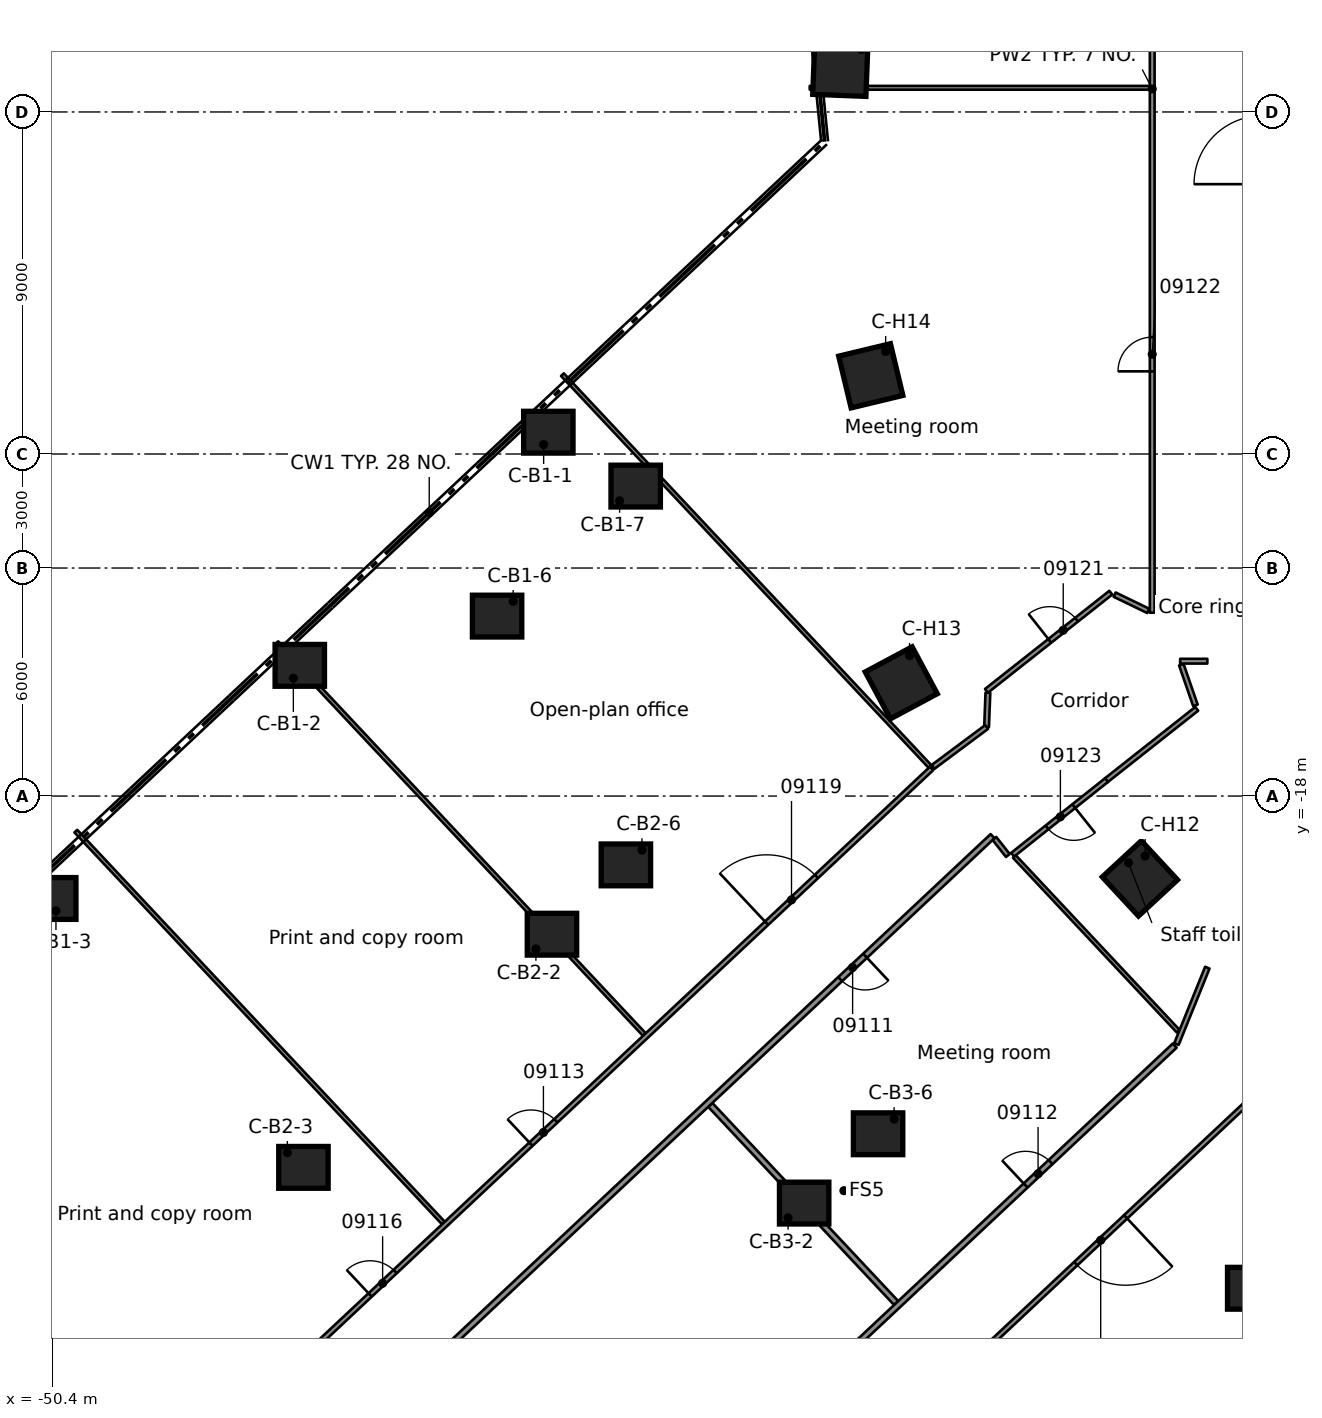
"""IFC4 building model, lengths in metres.
Left out: names, types, materials, properties, quantities, classifications, styles, units other than length and angle.
Written with IfcOpenShell. Run it as: python <this file> out.ifc"""

import sys

from ifc_helpers import new_model, si_unit, direction, frame, frame_2d, origin, origin_2d, place, context, subcontext, project, spatial, rectangle, extrude, element, fill, save


model = new_model("IFC4")
c1 = context("Model", 3, precision=1e-05, world=origin(), true_north=direction((0.0, 1.0)))
c2 = subcontext(c1, "Body", "Model", "MODEL_VIEW")
j1 = project(units=[si_unit("LENGTHUNIT", "METRE"), si_unit("PLANEANGLEUNIT", "RADIAN")], contexts=[c1])
p1 = place(None, origin())
s1 = spatial("IfcSite", under=j1, at=p1, CompositionType="ELEMENT")
p2 = place(p1, origin())
s2 = spatial("IfcBuilding", under=s1, at=p2, CompositionType="ELEMENT")
p3 = place(p2, frame((0.0, 0.0, 40.8)))
s3 = spatial("IfcBuildingStorey", under=s2, at=p3, CompositionType="ELEMENT", Elevation=40.8)
for number, where, z_axis, x_axis in (
    (1, (-37.341, -8.426, 0.0), (0.0, 0.0, 1.0), (1.0, 0.0, 0.0)),
    (2, (-43.881, -14.561, 0.0), (0.0, 0.0, 1.0), (1.0, 0.0, 0.0)),
    (3, (-50.421, -20.695, 0.0), (0.0, 0.0, 1.0), (1.0, 0.0, 0.0)),
    (4, (-38.689, -13.265, 0.0), (0.0, 0.0, 1.0), (1.0, 0.0, 0.0)),
    (5, (-35.042, -9.844, 0.0), (0.0, 0.0, 1.0), (1.0, 0.0, 0.0)),
    (6, (-37.245, -21.635, 0.0), (0.0, 0.0, 1.0), (1.0, 0.0, 0.0)),
    (7, (-43.785, -27.77, 0.0), (0.0, 0.0, 1.0), (1.0, 0.0, 0.0)),
    (8, (-35.3, -19.811, 0.0), (0.0, 0.0, 1.0), (1.0, 0.0, 0.0)),
    (9, (-30.609, -28.71, 0.0), (0.0, 0.0, 1.0), (1.0, 0.0, 0.0)),
    (10, (-28.664, -26.886, 0.0), (0.0, 0.0, 1.0), (1.0, 0.0, 0.0)),
    (11, (-18.819, -30.951, 0.0), (0.0, 0.0, 1.0), (1.0, 0.0, 0.0)),
):
    element("IfcColumn", number, at=place(p3, frame(where, z_axis=z_axis, x_axis=x_axis)), inside=s3, PredefinedType="COLUMN", context=c2, shape_type="SweptSolid", body=[
        extrude(rectangle(XDim=1.3, YDim=1.1, at=origin_2d()), origin(), (0.0, 0.0, 1.0), 3.5),
    ])
for number, where, z_axis, x_axis in (
    (12, (-21.774, -20.167, 0.0), (0.0, 0.0, 1.0), (-0.734, -0.68, 0.0)),
    (13, (-28.054, -15.021, 0.0), (0.0, 0.0, 1.0), (-0.882, -0.472, 0.0)),
    (14, (-28.856, -6.942, 0.0), (0.0, 0.0, 1.0), (-0.972, -0.234, 0.0)),
    (15, (-29.657, 1.136, 0.0), (0.0, 0.0, 1.0), (-0.999, 0.038, 0.0)),
):
    element("IfcColumn", number, at=place(p3, frame(where, z_axis=z_axis, x_axis=x_axis)), inside=s3, PredefinedType="COLUMN", context=c2, shape_type="SweptSolid", body=[
        extrude(rectangle(XDim=1.4, YDim=1.4, at=origin_2d()), origin(), (0.0, 0.0, 1.0), 3.5),
    ])
p4 = place(p3, frame((-20.684, -14.543, 0.0), z_axis=(0.0, 0.0, 1.0), x_axis=(0.32765097617, -0.944798834575, 0.0)))
e16 = element("IfcWall", 16, at=p4, inside=s3, PredefinedType="PARTITIONING", context=c2, shape_type="SweptSolid", body=[
    extrude(rectangle(XDim=1.133, YDim=0.125, at=frame_2d((0.566, 0.0))), origin(), (0.0, 0.0, 1.0), 3.06),
])
p5 = place(p3, frame((-25.604, -19.114, 0.0), z_axis=(0.0, 0.0, 1.0), x_axis=(0.619381829891, -0.785089898548, 0.0)))
e17 = element("IfcWall", 17, at=p5, inside=s3, PredefinedType="PARTITIONING", context=c2, shape_type="SweptSolid", body=[
    extrude(rectangle(XDim=0.573, YDim=0.125, at=frame_2d((0.287, 0.0))), origin(), (0.0, 0.0, 1.0), 3.06),
])
p6 = place(p3, frame((-25.774, -15.281, 0.0), z_axis=(0.0, 0.0, 1.0), x_axis=(-0.038899975067, -0.999243109528, 0.0)))
e18 = element("IfcWall", 18, at=p6, inside=s3, PredefinedType="PARTITIONING", context=c2, shape_type="SweptSolid", body=[
    extrude(rectangle(XDim=0.904, YDim=0.125, at=frame_2d((0.452, 0.0))), origin(), (0.0, 0.0, 1.0), 3.06),
])
p7 = place(p3, frame((-49.774, -18.923, 0.0), z_axis=(0.0, 0.0, 1.0), x_axis=(0.684111730838, -0.729377227317, 0.0)))
e19 = element("IfcWall", 19, at=p7, inside=s3, PredefinedType="PARTITIONING", context=c2, shape_type="SweptSolid", body=[
    extrude(rectangle(XDim=14.136, YDim=0.1, at=frame_2d((7.068, 0.0))), origin(), (0.0, 0.0, 1.0), 3.06),
])
p8 = place(p3, frame((-44.487, -13.963, 0.0), z_axis=(0.0, 0.0, 1.0), x_axis=(0.684112301014, -0.729376692526, 0.0)))
e20 = element("IfcWall", 20, at=p8, inside=s3, PredefinedType="PARTITIONING", context=c2, shape_type="SweptSolid", body=[
    extrude(rectangle(XDim=14.137, YDim=0.1, at=frame_2d((7.068, 0.0))), origin(), (0.0, 0.0, 1.0), 3.06),
])
p9 = place(p3, frame((-33.079, -26.126, 0.0), z_axis=(0.0, 0.0, 1.0), x_axis=(0.684155795313, -0.729335895003, 0.0)))
e21 = element("IfcWall", 21, at=p9, inside=s3, PredefinedType="PARTITIONING", context=c2, shape_type="SweptSolid", body=[
    extrude(rectangle(XDim=7.149, YDim=0.15, at=frame_2d((3.575, 0.0))), origin(), (0.0, 0.0, 1.0), 3.06),
])
p10 = place(p3, frame((-36.97, -6.912, 0.0), z_axis=(0.0, 0.0, 1.0), x_axis=(0.684148478852, -0.729342758163, 0.0)))
e22 = element("IfcWall", 22, at=p10, inside=s3, PredefinedType="PARTITIONING", context=c2, shape_type="SweptSolid", body=[
    extrude(rectangle(XDim=14.137, YDim=0.1, at=frame_2d((7.069, 0.0))), origin(), (0.0, 0.0, 1.0), 3.06),
])
p11 = place(p3, frame((-25.079, -19.589, 0.0), z_axis=(0.0, 0.0, 1.0), x_axis=(0.684071212636, -0.729415228825, 0.0)))
e23 = element("IfcWall", 23, at=p11, inside=s3, PredefinedType="PARTITIONING", context=c2, shape_type="SweptSolid", body=[
    extrude(rectangle(XDim=6.305, YDim=0.1, at=frame_2d((3.152, 0.0))), origin(), (0.0, 0.0, 1.0), 3.06),
])
p12 = place(p3, frame((-22.439, -12.7, 0.0), z_axis=(0.0, 0.0, 1.0), x_axis=(0.900058849061, -0.435768365335, 0.0)))
e24 = element("IfcWall", 24, at=p12, inside=s3, PredefinedType="PARTITIONING", context=c2, shape_type="SweptSolid", body=[
    extrude(rectangle(XDim=0.984, YDim=0.125, at=frame_2d((0.492, 0.0))), origin(), (0.0, 0.0, 1.0), 3.06),
])
p13 = place(p3, frame((-20.715, -14.451, 0.0), z_axis=(0.0, 0.0, 1.0), x_axis=(1.0, 0.0, 0.0)))
e25 = element("IfcWall", 25, at=p13, inside=s3, PredefinedType="PARTITIONING", context=c2, shape_type="SweptSolid", body=[
    extrude(rectangle(XDim=0.715, YDim=0.125, at=frame_2d((0.357, 0.0))), origin(), (0.0, 0.0, 1.0), 3.06),
])
p14 = place(p3, frame((-30.462, 0.636, 0.0), z_axis=(0.0, 0.0, 1.0), x_axis=(1.0, 0.0, 0.0)))
e26 = element("IfcWall", 26, at=p14, inside=s3, PredefinedType="PARTITIONING", context=c2, shape_type="SweptSolid", body=[
    extrude(rectangle(XDim=8.95, YDim=0.1, at=frame_2d((4.475, 0.0))), origin(), (0.0, 0.0, 1.0), 3.06),
])
p15 = place(p3, frame((-25.809, -16.184, 0.0), z_axis=(0.0, 0.0, 1.0), x_axis=(-0.801880216927, -0.597484826336, 0.0)))
e27 = element("IfcWall", 27, at=p15, inside=s3, PredefinedType="PARTITIONING", context=c2, shape_type="SweptSolid", body=[
    extrude(rectangle(XDim=1.757, YDim=0.125, at=frame_2d((0.878, 0.0))), origin(), (0.0, 0.0, 1.0), 3.06),
])
p16 = place(p3, frame((-22.653, -17.58, 0.0), z_axis=(0.0, 0.0, 1.0), x_axis=(0.784758802797, 0.619801275759, 0.0)))
e28 = element("IfcWall", 28, at=p16, inside=s3, PredefinedType="PARTITIONING", context=c2, shape_type="SweptSolid", body=[
    extrude(rectangle(XDim=3.025, YDim=0.125, at=frame_2d((1.513, 0.0))), origin(), (0.0, 0.0, 1.0), 3.06),
])
p17 = place(p3, frame((-25.812, -15.232, 0.0), z_axis=(0.0, 0.0, 1.0), x_axis=(0.784897756529, 0.619625299513, 0.0)))
e29 = element("IfcWall", 29, at=p17, inside=s3, PredefinedType="PARTITIONING", context=c2, shape_type="SweptSolid", body=[
    extrude(rectangle(XDim=4.169, YDim=0.125, at=frame_2d((2.084, 0.0))), origin(), (0.0, 0.0, 1.0), 3.06),
])
p18 = place(p17, frame((2.124, 0.0, 0.0)))
e30 = element("IfcOpeningElement", 30, at=p18, cuts=e29, PredefinedType="OPENING", context=c2, shape_type="SweptSolid", body=[
    extrude(rectangle(XDim=0.9, YDim=2.1, at=frame_2d((0.45, 1.05))), frame((0.0, 0.073, 0.0), z_axis=(0.0, -1.0, 0.0), x_axis=(1.0, 0.0, 0.0)), (0.0, 0.0, 1.0), 0.145),
])
p19 = place(p3, frame((-22.653, -17.581, 0.0), z_axis=(0.0, 0.0, 1.0), x_axis=(-0.782918971935, -0.622123688171, 0.0)))
e31 = element("IfcWall", 31, at=p19, inside=s3, PredefinedType="PARTITIONING", context=c2, shape_type="SweptSolid", body=[
    extrude(rectangle(XDim=3.154, YDim=0.125, at=frame_2d((1.577, 0.0))), origin(), (0.0, 0.0, 1.0), 3.06),
])
p20 = place(p19, frame((1.1, 0.0, 0.0)))
e32 = element("IfcOpeningElement", 32, at=p20, cuts=e31, PredefinedType="OPENING", context=c2, shape_type="SweptSolid", body=[
    extrude(rectangle(XDim=0.9, YDim=2.1, at=frame_2d((0.45, 1.05))), frame((0.0, 0.073, 0.0), z_axis=(0.0, -1.0, 0.0), x_axis=(1.0, 0.0, 0.0)), (0.0, 0.0, 1.0), 0.145),
])
p21 = place(p3, frame((-18.829, -25.957, 0.0), z_axis=(0.0, 0.0, 1.0), x_axis=(-0.729377966172, -0.684110943096, 0.0)))
e33 = element("IfcWall", 33, at=p21, inside=s3, PredefinedType="PARTITIONING", context=c2, shape_type="SweptSolid", body=[
    extrude(rectangle(XDim=25.009, YDim=0.125, at=frame_2d((12.504, 0.0))), origin(), (0.0, 0.0, 1.0), 3.06),
])
p22 = place(p21, frame((4.552, 0.0, 0.0)))
e34 = element("IfcOpeningElement", 34, at=p22, cuts=e33, PredefinedType="OPENING", context=c2, shape_type="SweptSolid", body=[
    extrude(rectangle(XDim=1.8, YDim=2.1, at=frame_2d((0.9, 1.05))), frame((0.0, 0.073, 0.0), z_axis=(0.0, -1.0, 0.0), x_axis=(1.0, 0.0, 0.0)), (0.0, 0.0, 1.0), 0.145),
])
p23 = place(p21, frame((13.609, 0.0, 0.0)))
e35 = element("IfcOpeningElement", 35, at=p23, cuts=e33, PredefinedType="OPENING", context=c2, shape_type="SweptSolid", body=[
    extrude(rectangle(XDim=0.9, YDim=2.1, at=frame_2d((0.45, 1.05))), frame((0.0, 0.073, 0.0), z_axis=(0.0, -1.0, 0.0), x_axis=(1.0, 0.0, 0.0)), (0.0, 0.0, 1.0), 0.145),
])
p24 = place(p21, frame((20.859, 0.0, 0.0)))
e36 = element("IfcOpeningElement", 36, at=p24, cuts=e33, PredefinedType="OPENING", context=c2, shape_type="SweptSolid", body=[
    extrude(rectangle(XDim=0.9, YDim=2.1, at=frame_2d((0.45, 1.05))), frame((0.0, 0.073, 0.0), z_axis=(0.0, -1.0, 0.0), x_axis=(1.0, 0.0, 0.0)), (0.0, 0.0, 1.0), 0.145),
])
p25 = place(p3, frame((-36.743, -39.467, 0.0), z_axis=(0.0, 0.0, 1.0), x_axis=(0.729355050799, 0.684135373939, 0.0)))
e37 = element("IfcWall", 37, at=p25, inside=s3, PredefinedType="PARTITIONING", context=c2, shape_type="SweptSolid", body=[
    extrude(rectangle(XDim=21.78, YDim=0.15, at=frame_2d((10.89, 0.0))), origin(), (0.0, 0.0, 1.0), 3.06),
])
p26 = place(p25, frame((16.399, 0.0, 0.0)))
e38 = element("IfcOpeningElement", 38, at=p26, cuts=e37, PredefinedType="OPENING", context=c2, shape_type="SweptSolid", body=[
    extrude(rectangle(XDim=0.9, YDim=2.1, at=frame_2d((0.45, 1.05))), frame((0.0, 0.085, 0.0), z_axis=(0.0, -1.0, 0.0), x_axis=(1.0, 0.0, 0.0)), (0.0, 0.0, 1.0), 0.17),
])
p27 = place(p25, frame((5.35, 0.0, 0.0)))
e39 = element("IfcOpeningElement", 39, at=p27, cuts=e37, PredefinedType="OPENING", context=c2, shape_type="SweptSolid", body=[
    extrude(rectangle(XDim=0.9, YDim=2.1, at=frame_2d((0.45, 1.05))), frame((0.0, 0.085, 0.0), z_axis=(0.0, -1.0, 0.0), x_axis=(1.0, 0.0, 0.0)), (0.0, 0.0, 1.0), 0.17),
])
p28 = place(p3, frame((-25.651, -19.055, 0.0), z_axis=(0.0, 0.0, 1.0), x_axis=(-0.729328318393, -0.684163872175, 0.0)))
e40 = element("IfcWall", 40, at=p28, inside=s3, PredefinedType="PARTITIONING", context=c2, shape_type="SweptSolid", body=[
    extrude(rectangle(XDim=22.055, YDim=0.15, at=frame_2d((11.027, 0.0))), origin(), (0.0, 0.0, 1.0), 3.06),
])
p29 = place(p28, frame((4.6, 0.0, 0.0)))
e41 = element("IfcOpeningElement", 41, at=p29, cuts=e40, PredefinedType="OPENING", context=c2, shape_type="SweptSolid", body=[
    extrude(rectangle(XDim=0.9, YDim=2.1, at=frame_2d((0.45, 1.05))), frame((0.0, 0.085, 0.0), z_axis=(0.0, -1.0, 0.0), x_axis=(1.0, 0.0, 0.0)), (0.0, 0.0, 1.0), 0.17),
])
p30 = place(p3, frame((-45.13, -34.035, 0.0), z_axis=(0.0, 0.0, 1.0), x_axis=(0.729450212829, 0.684033907788, 0.0)))
e42 = element("IfcWall", 42, at=p30, inside=s3, PredefinedType="PARTITIONING", context=c2, shape_type="SweptSolid", body=[
    extrude(rectangle(XDim=24.507, YDim=0.125, at=frame_2d((12.254, 0.0))), origin(), (0.0, 0.0, 1.0), 3.06),
])
p31 = place(p30, frame((10.051, 0.0, 0.0)))
e43 = element("IfcOpeningElement", 43, at=p31, cuts=e42, PredefinedType="OPENING", context=c2, shape_type="SweptSolid", body=[
    extrude(rectangle(XDim=0.9, YDim=2.1, at=frame_2d((0.45, 1.05))), frame((0.0, 0.073, 0.0), z_axis=(0.0, -1.0, 0.0), x_axis=(1.0, 0.0, 0.0)), (0.0, 0.0, 1.0), 0.145),
])
p32 = place(p30, frame((4.25, 0.0, 0.0)))
e44 = element("IfcOpeningElement", 44, at=p32, cuts=e42, PredefinedType="OPENING", context=c2, shape_type="SweptSolid", body=[
    extrude(rectangle(XDim=0.9, YDim=2.1, at=frame_2d((0.45, 1.05))), frame((0.0, 0.073, 0.0), z_axis=(0.0, -1.0, 0.0), x_axis=(1.0, 0.0, 0.0)), (0.0, 0.0, 1.0), 0.145),
])
p33 = place(p30, frame((18.55, 0.0, 0.0)))
e45 = element("IfcOpeningElement", 45, at=p33, cuts=e42, PredefinedType="OPENING", context=c2, shape_type="SweptSolid", body=[
    extrude(rectangle(XDim=1.8, YDim=2.1, at=frame_2d((0.9, 1.05))), frame((0.0, 0.073, 0.0), z_axis=(0.0, -1.0, 0.0), x_axis=(1.0, 0.0, 0.0)), (0.0, 0.0, 1.0), 0.145),
])
p34 = place(p3, frame((-20.0, -22.516, 0.0), z_axis=(0.0, 0.0, 1.0), x_axis=(-0.374768568838, -0.92711839579, 0.0)))
e46 = element("IfcWall", 46, at=p34, inside=s3, PredefinedType="PARTITIONING", context=c2, shape_type="SweptSolid", body=[
    extrude(rectangle(XDim=2.167, YDim=0.125, at=frame_2d((1.083, 0.0))), origin(), (0.0, 0.0, 1.0), 3.06),
])
p35 = place(p3, frame((-21.45, -13.175, 0.0), z_axis=(0.0, 0.0, 1.0), x_axis=(0.0, 1.0, 0.0)))
e47 = element("IfcWall", 47, at=p35, inside=s3, PredefinedType="PARTITIONING", context=c2, shape_type="SweptSolid", body=[
    extrude(rectangle(XDim=27.561, YDim=0.125, at=frame_2d((13.781, 0.0))), origin(), (0.0, 0.0, 1.0), 3.06),
])
p36 = place(p35, frame((6.35, 0.0, 0.0)))
e48 = element("IfcOpeningElement", 48, at=p36, cuts=e47, PredefinedType="OPENING", context=c2, shape_type="SweptSolid", body=[
    extrude(rectangle(XDim=0.9, YDim=2.1, at=frame_2d((0.45, 1.05))), frame((0.0, 0.073, 0.0), z_axis=(0.0, -1.0, 0.0), x_axis=(1.0, 0.0, 0.0)), (0.0, 0.0, 1.0), 0.145),
])
p37 = place(p35, frame((16.911, 0.0, 0.0)))
e49 = element("IfcOpeningElement", 49, at=p37, cuts=e47, PredefinedType="OPENING", context=c2, shape_type="SweptSolid", body=[
    extrude(rectangle(XDim=1.8, YDim=2.1, at=frame_2d((0.9, 1.05))), frame((0.0, 0.073, 0.0), z_axis=(0.0, -1.0, 0.0), x_axis=(1.0, 0.0, 0.0)), (0.0, 0.0, 1.0), 0.145),
])
p38 = place(p35, frame((23.974, 0.0, 0.0)))
e50 = element("IfcOpeningElement", 50, at=p38, cuts=e47, PredefinedType="OPENING", context=c2, shape_type="SweptSolid", body=[
    extrude(rectangle(XDim=1.1, YDim=2.1, at=frame_2d((0.55, 1.05))), frame((0.0, 0.073, 0.0), z_axis=(0.0, -1.0, 0.0), x_axis=(1.0, 0.0, 0.0)), (0.0, 0.0, 1.0), 0.145),
])
p39 = place(p22, origin())
e51 = element("IfcDoor", 51, at=p39, inside=s3, OperationType="DOUBLE_DOOR_SINGLE_SWING", PredefinedType="DOOR", context=c2, shape_type="SweptSolid", body=[
    extrude(rectangle(XDim=1.8, YDim=2.1, at=frame_2d((0.9, 1.05))), frame((0.0, 0.025, 0.0), z_axis=(0.0, -1.0, 0.0), x_axis=(1.0, 0.0, 0.0)), (0.0, 0.0, 1.0), 0.05),
])
fill(e34, e51)
p40 = place(p29, origin())
e52 = element("IfcDoor", 52, at=p40, inside=s3, OperationType="SINGLE_SWING_LEFT", PredefinedType="DOOR", context=c2, shape_type="SweptSolid", body=[
    extrude(rectangle(XDim=0.9, YDim=2.1, at=frame_2d((0.45, 1.05))), frame((0.0, 0.025, 0.0), z_axis=(0.0, -1.0, 0.0), x_axis=(1.0, 0.0, 0.0)), (0.0, 0.0, 1.0), 0.05),
])
fill(e41, e52)
p41 = place(p26, origin())
e53 = element("IfcDoor", 53, at=p41, inside=s3, OperationType="SINGLE_SWING_RIGHT", PredefinedType="DOOR", context=c2, shape_type="SweptSolid", body=[
    extrude(rectangle(XDim=0.9, YDim=2.1, at=frame_2d((0.45, 1.05))), frame((0.0, 0.025, 0.0), z_axis=(0.0, -1.0, 0.0), x_axis=(1.0, 0.0, 0.0)), (0.0, 0.0, 1.0), 0.05),
])
fill(e38, e53)
p42 = place(p31, origin())
e54 = element("IfcDoor", 54, at=p42, inside=s3, OperationType="SINGLE_SWING_LEFT", PredefinedType="DOOR", context=c2, shape_type="SweptSolid", body=[
    extrude(rectangle(XDim=0.9, YDim=2.1, at=frame_2d((0.45, 1.05))), frame((0.0, 0.025, 0.0), z_axis=(0.0, -1.0, 0.0), x_axis=(1.0, 0.0, 0.0)), (0.0, 0.0, 1.0), 0.05),
])
fill(e43, e54)
p43 = place(p32, origin())
e55 = element("IfcDoor", 55, at=p43, inside=s3, OperationType="SINGLE_SWING_LEFT", PredefinedType="DOOR", context=c2, shape_type="SweptSolid", body=[
    extrude(rectangle(XDim=0.9, YDim=2.1, at=frame_2d((0.45, 1.05))), frame((0.0, 0.025, 0.0), z_axis=(0.0, -1.0, 0.0), x_axis=(1.0, 0.0, 0.0)), (0.0, 0.0, 1.0), 0.05),
])
fill(e44, e55)
p44 = place(p33, origin())
e56 = element("IfcDoor", 56, at=p44, inside=s3, OperationType="DOUBLE_DOOR_SINGLE_SWING", PredefinedType="DOOR", context=c2, shape_type="SweptSolid", body=[
    extrude(rectangle(XDim=1.8, YDim=2.1, at=frame_2d((0.9, 1.05))), frame((0.0, 0.025, 0.0), z_axis=(0.0, -1.0, 0.0), x_axis=(1.0, 0.0, 0.0)), (0.0, 0.0, 1.0), 0.05),
])
fill(e45, e56)
p45 = place(p18, origin())
e57 = element("IfcDoor", 57, at=p45, inside=s3, OperationType="SINGLE_SWING_RIGHT", PredefinedType="DOOR", context=c2, shape_type="SweptSolid", body=[
    extrude(rectangle(XDim=0.9, YDim=2.1, at=frame_2d((0.45, 1.05))), frame((0.0, 0.025, 0.0), z_axis=(0.0, -1.0, 0.0), x_axis=(1.0, 0.0, 0.0)), (0.0, 0.0, 1.0), 0.05),
])
fill(e30, e57)
p46 = place(p36, origin())
e58 = element("IfcDoor", 58, at=p46, inside=s3, OperationType="SINGLE_SWING_LEFT", PredefinedType="DOOR", context=c2, shape_type="SweptSolid", body=[
    extrude(rectangle(XDim=0.9, YDim=2.1, at=frame_2d((0.45, 1.05))), frame((0.0, 0.025, 0.0), z_axis=(0.0, -1.0, 0.0), x_axis=(1.0, 0.0, 0.0)), (0.0, 0.0, 1.0), 0.05),
])
fill(e48, e58)
p47 = place(p20, origin())
e59 = element("IfcDoor", 59, at=p47, inside=s3, OperationType="SINGLE_SWING_LEFT", PredefinedType="DOOR", context=c2, shape_type="SweptSolid", body=[
    extrude(rectangle(XDim=0.9, YDim=2.1, at=frame_2d((0.45, 1.05))), frame((0.0, 0.025, 0.0), z_axis=(0.0, -1.0, 0.0), x_axis=(1.0, 0.0, 0.0)), (0.0, 0.0, 1.0), 0.05),
])
fill(e32, e59)
save(model, sys.argv[1])
